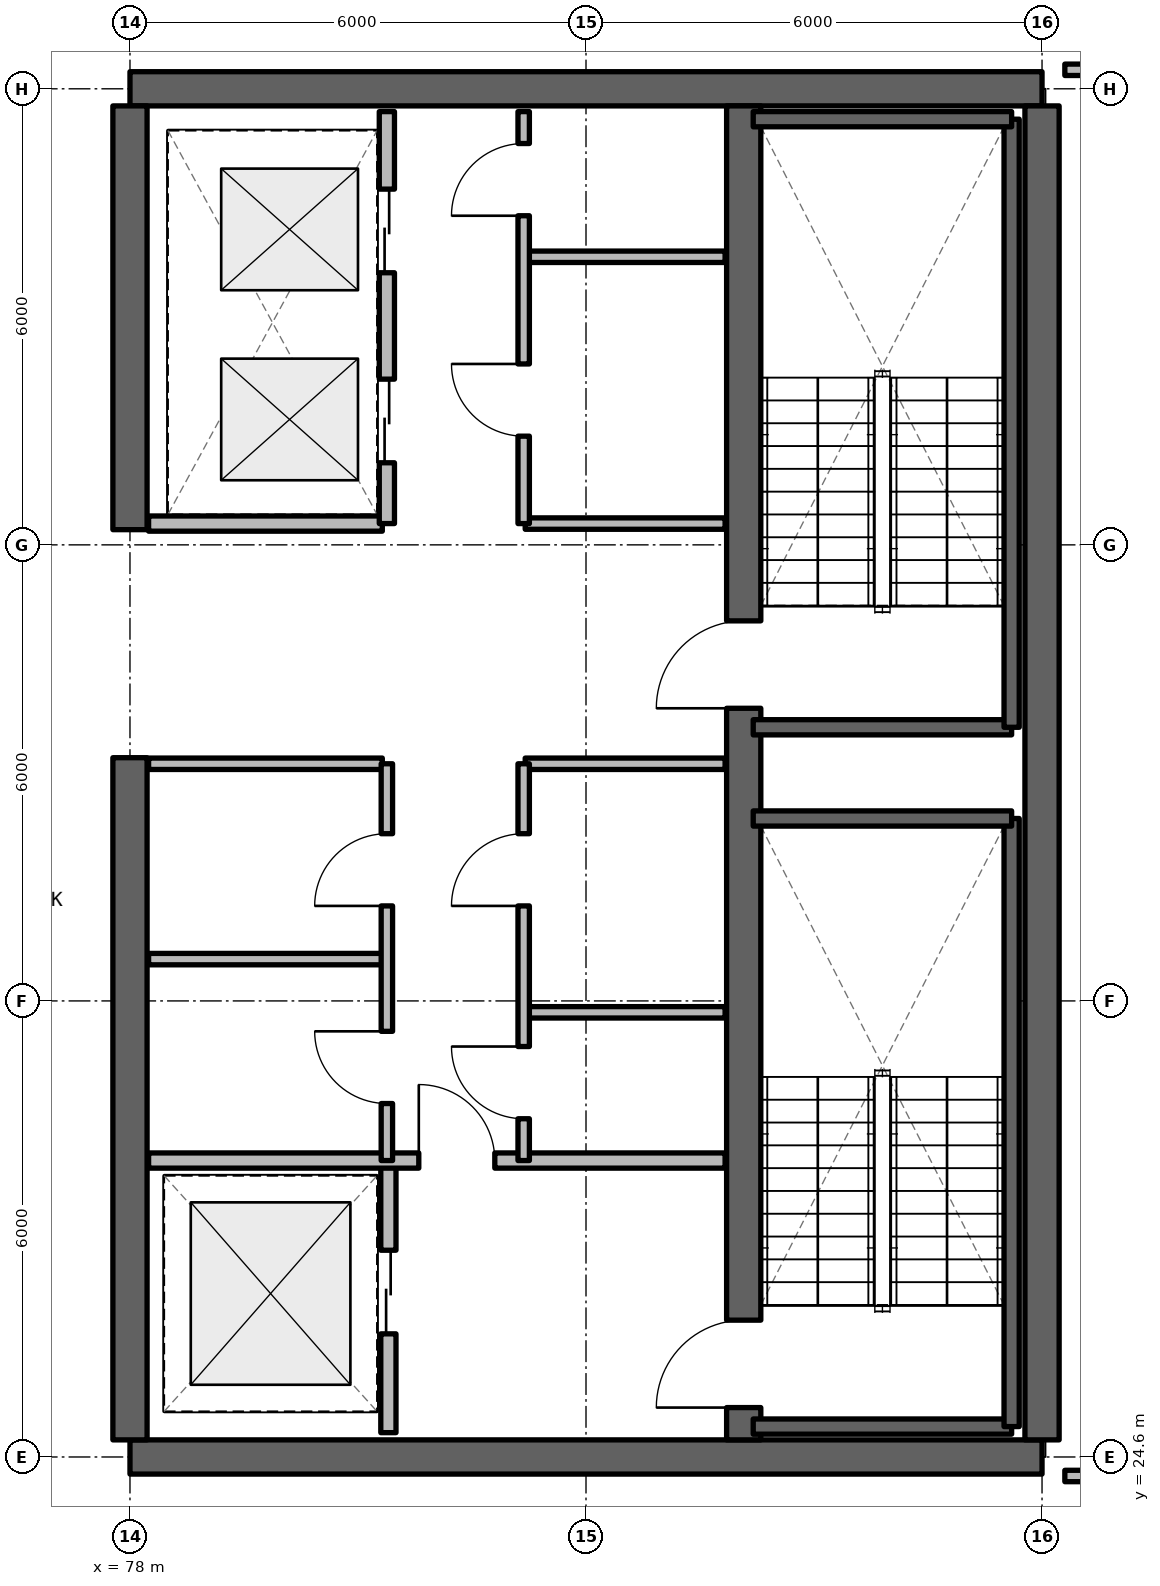
"""IFC4 building model, lengths in metres.
Left out: names, types, materials, properties, quantities, classifications, styles, units other than length and angle.
Written with IfcOpenShell. Run it as: python <this file> out.ifc"""

import sys

from ifc_helpers import new_model, si_unit, direction, frame, frame_2d, origin, place, context, subcontext, project, spatial, rectangle, extrude, element, fill, save


model = new_model("IFC4")
c1 = context("Model", 3, precision=1e-05, world=origin(), true_north=direction((0.0, 1.0)))
c2 = subcontext(c1, "Body", "Model", "MODEL_VIEW")
j1 = project(units=[si_unit("LENGTHUNIT", "METRE"), si_unit("PLANEANGLEUNIT", "RADIAN")], contexts=[c1])
p1 = place(None, origin())
s1 = spatial("IfcSite", under=j1, at=p1, CompositionType="ELEMENT")
p2 = place(p1, origin())
s2 = spatial("IfcBuilding", under=s1, at=p2, CompositionType="ELEMENT")
p3 = place(p2, frame((0.0, 0.0, 267.96)))
s3 = spatial("IfcBuildingStorey", under=s2, at=p3, CompositionType="ELEMENT", Elevation=267.96)
for number, where, z_axis, x_axis in (
    (1, (78.0, 24.6, 0.0), (0.0, 0.0, 1.0), (1.0, 0.0, 0.0)),
    (2, (90.0, 42.6, 0.0), (0.0, 0.0, 1.0), (-1.0, 0.0, 0.0)),
):
    element("IfcWall", number, at=place(p3, frame(where, z_axis=z_axis, x_axis=x_axis)), inside=s3, PredefinedType="SHEAR", context=c2, shape_type="SweptSolid", body=[
        extrude(rectangle(XDim=12.0, YDim=0.45, at=frame_2d((6.0, 0.0))), origin(), (0.0, 0.0, 1.0), 3.63),
    ])
p4 = place(p3, frame((90.0, 24.825, 0.0), z_axis=(0.0, 0.0, 1.0), x_axis=(0.0, 1.0, 0.0)))
e3 = element("IfcWall", 3, at=p4, inside=s3, PredefinedType="SHEAR", context=c2, shape_type="SweptSolid", body=[
    extrude(rectangle(XDim=17.55, YDim=0.45, at=frame_2d((8.775, 0.0))), origin(), (0.0, 0.0, 1.0), 3.63),
])
p5 = place(p3, frame((78.0, 24.825, 0.0), z_axis=(0.0, 0.0, 1.0), x_axis=(0.0, 1.0, 0.0)))
e4 = element("IfcWall", 4, at=p5, inside=s3, PredefinedType="SHEAR", context=c2, shape_type="SweptSolid", body=[
    extrude(rectangle(XDim=8.975, YDim=0.45, at=frame_2d((4.488, 0.0))), origin(), (0.0, 0.0, 1.0), 3.63),
])
p6 = place(p3, frame((78.0, 36.8, 0.0), z_axis=(0.0, 0.0, 1.0), x_axis=(0.0, 1.0, 0.0)))
e5 = element("IfcWall", 5, at=p6, inside=s3, PredefinedType="SHEAR", context=c2, shape_type="SweptSolid", body=[
    extrude(rectangle(XDim=5.575, YDim=0.45, at=frame_2d((2.788, 0.0))), origin(), (0.0, 0.0, 1.0), 3.63),
])
p7 = place(p3, frame((86.075, 24.825, 0.0), z_axis=(0.0, 0.0, 1.0), x_axis=(0.0, 1.0, 0.0)))
e6 = element("IfcWall", 6, at=p7, inside=s3, PredefinedType="SHEAR", context=c2, shape_type="SweptSolid", body=[
    extrude(rectangle(XDim=17.55, YDim=0.45, at=frame_2d((8.775, 0.0))), origin(), (0.0, 0.0, 1.0), 3.63),
])
p8 = place(p7, frame((0.425, 0.0, 0.0)))
e7 = element("IfcOpeningElement", 7, at=p8, cuts=e6, PredefinedType="OPENING", context=c2, shape_type="SweptSolid", body=[
    extrude(rectangle(XDim=1.15, YDim=2.15, at=frame_2d((0.575, 1.075))), frame((0.0, 0.235, 0.0), z_axis=(0.0, -1.0, 0.0), x_axis=(1.0, 0.0, 0.0)), (0.0, 0.0, 1.0), 0.47),
])
p9 = place(p7, frame((9.625, 0.0, 0.0)))
e8 = element("IfcOpeningElement", 8, at=p9, cuts=e6, PredefinedType="OPENING", context=c2, shape_type="SweptSolid", body=[
    extrude(rectangle(XDim=1.15, YDim=2.15, at=frame_2d((0.575, 1.075))), frame((0.0, 0.235, 0.0), z_axis=(0.0, -1.0, 0.0), x_axis=(1.0, 0.0, 0.0)), (0.0, 0.0, 1.0), 0.47),
])
p10 = place(p3, frame((81.4, 24.92, 0.0), z_axis=(0.0, 0.0, 1.0), x_axis=(0.0, 1.0, 0.0)))
e9 = element("IfcWall", 9, at=p10, inside=s3, PredefinedType="SOLIDWALL", context=c2, shape_type="SweptSolid", body=[
    extrude(rectangle(XDim=3.58, YDim=0.2, at=frame_2d((1.79, 0.0))), origin(), (0.0, 0.0, 1.0), 2.63),
])
p11 = place(p10, frame((1.3, 0.0, 0.0)))
e10 = element("IfcOpeningElement", 10, at=p11, cuts=e9, PredefinedType="OPENING", context=c2, shape_type="SweptSolid", body=[
    extrude(rectangle(XDim=1.1, YDim=2.2, at=frame_2d((0.55, 1.1))), frame((0.0, 0.11, 0.0), z_axis=(0.0, -1.0, 0.0), x_axis=(1.0, 0.0, 0.0)), (0.0, 0.0, 1.0), 0.22),
])
p12 = place(p3, frame((78.245, 28.5, 0.0), z_axis=(0.0, 0.0, 1.0), x_axis=(1.0, 0.0, 0.0)))
e11 = element("IfcWall", 11, at=p12, inside=s3, PredefinedType="SOLIDWALL", context=c2, shape_type="SweptSolid", body=[
    extrude(rectangle(XDim=7.585, YDim=0.2, at=frame_2d((3.792, 0.0))), origin(), (0.0, 0.0, 1.0), 2.63),
])
p13 = place(p12, frame((3.555, 0.0, 0.0)))
e12 = element("IfcOpeningElement", 12, at=p13, cuts=e11, PredefinedType="OPENING", context=c2, shape_type="SweptSolid", body=[
    extrude(rectangle(XDim=1.0, YDim=2.15, at=frame_2d((0.5, 1.075))), frame((0.0, 0.11, 0.0), z_axis=(0.0, -1.0, 0.0), x_axis=(1.0, 0.0, 0.0)), (0.0, 0.0, 1.0), 0.22),
])
for number, where, z_axis, x_axis in (
    (13, (83.2, 30.45, 0.0), (0.0, 0.0, 1.0), (1.0, 0.0, 0.0)),
    (14, (83.2, 33.72, 0.0), (0.0, 0.0, 1.0), (1.0, 0.0, 0.0)),
):
    element("IfcWall", number, at=place(p3, frame(where, z_axis=z_axis, x_axis=x_axis)), inside=s3, PredefinedType="SOLIDWALL", context=c2, shape_type="SweptSolid", body=[
        extrude(rectangle(XDim=2.63, YDim=0.15, at=frame_2d((1.315, 0.0))), origin(), (0.0, 0.0, 1.0), 2.63),
    ])
p14 = place(p3, frame((83.18, 28.5, 0.0), z_axis=(0.0, 0.0, 1.0), x_axis=(0.0, 1.0, 0.0)))
e15 = element("IfcWall", 15, at=p14, inside=s3, PredefinedType="SOLIDWALL", context=c2, shape_type="SweptSolid", body=[
    extrude(rectangle(XDim=5.22, YDim=0.15, at=frame_2d((2.61, 0.0))), origin(), (0.0, 0.0, 1.0), 2.63),
])
p15 = place(p14, frame((0.55, 0.0, 0.0)))
e16 = element("IfcOpeningElement", 16, at=p15, cuts=e15, PredefinedType="OPENING", context=c2, shape_type="SweptSolid", body=[
    extrude(rectangle(XDim=0.95, YDim=2.15, at=frame_2d((0.475, 1.075))), frame((0.0, 0.085, 0.0), z_axis=(0.0, -1.0, 0.0), x_axis=(1.0, 0.0, 0.0)), (0.0, 0.0, 1.0), 0.17),
])
p16 = place(p14, frame((3.35, 0.0, 0.0)))
e17 = element("IfcOpeningElement", 17, at=p16, cuts=e15, PredefinedType="OPENING", context=c2, shape_type="SweptSolid", body=[
    extrude(rectangle(XDim=0.95, YDim=2.15, at=frame_2d((0.475, 1.075))), frame((0.0, 0.085, 0.0), z_axis=(0.0, -1.0, 0.0), x_axis=(1.0, 0.0, 0.0)), (0.0, 0.0, 1.0), 0.17),
])
for number, where, z_axis, x_axis in (
    (18, (78.245, 31.15, 0.0), (0.0, 0.0, 1.0), (1.0, 0.0, 0.0)),
    (19, (78.245, 33.72, 0.0), (0.0, 0.0, 1.0), (1.0, 0.0, 0.0)),
):
    element("IfcWall", number, at=place(p3, frame(where, z_axis=z_axis, x_axis=x_axis)), inside=s3, PredefinedType="SOLIDWALL", context=c2, shape_type="SweptSolid", body=[
        extrude(rectangle(XDim=3.075, YDim=0.15, at=frame_2d((1.538, 0.0))), origin(), (0.0, 0.0, 1.0), 2.63),
    ])
p17 = place(p3, frame((81.38, 28.5, 0.0), z_axis=(0.0, 0.0, 1.0), x_axis=(0.0, 1.0, 0.0)))
e20 = element("IfcWall", 20, at=p17, inside=s3, PredefinedType="SOLIDWALL", context=c2, shape_type="SweptSolid", body=[
    extrude(rectangle(XDim=5.22, YDim=0.15, at=frame_2d((2.61, 0.0))), origin(), (0.0, 0.0, 1.0), 2.63),
])
p18 = place(p17, frame((0.75, 0.0, 0.0)))
e21 = element("IfcOpeningElement", 21, at=p18, cuts=e20, PredefinedType="OPENING", context=c2, shape_type="SweptSolid", body=[
    extrude(rectangle(XDim=0.95, YDim=2.15, at=frame_2d((0.475, 1.075))), frame((0.0, 0.085, 0.0), z_axis=(0.0, -1.0, 0.0), x_axis=(1.0, 0.0, 0.0)), (0.0, 0.0, 1.0), 0.17),
])
p19 = place(p17, frame((3.35, 0.0, 0.0)))
e22 = element("IfcOpeningElement", 22, at=p19, cuts=e20, PredefinedType="OPENING", context=c2, shape_type="SweptSolid", body=[
    extrude(rectangle(XDim=0.95, YDim=2.15, at=frame_2d((0.475, 1.075))), frame((0.0, 0.085, 0.0), z_axis=(0.0, -1.0, 0.0), x_axis=(1.0, 0.0, 0.0)), (0.0, 0.0, 1.0), 0.17),
])
for number, where, z_axis, x_axis in (
    (23, (83.2, 36.88, 0.0), (0.0, 0.0, 1.0), (1.0, 0.0, 0.0)),
    (24, (83.2, 40.39, 0.0), (0.0, 0.0, 1.0), (1.0, 0.0, 0.0)),
):
    element("IfcWall", number, at=place(p3, frame(where, z_axis=z_axis, x_axis=x_axis)), inside=s3, PredefinedType="SOLIDWALL", context=c2, shape_type="SweptSolid", body=[
        extrude(rectangle(XDim=2.63, YDim=0.15, at=frame_2d((1.315, 0.0))), origin(), (0.0, 0.0, 1.0), 2.63),
    ])
p20 = place(p3, frame((83.18, 36.88, 0.0), z_axis=(0.0, 0.0, 1.0), x_axis=(0.0, 1.0, 0.0)))
e25 = element("IfcWall", 25, at=p20, inside=s3, PredefinedType="SOLIDWALL", context=c2, shape_type="SweptSolid", body=[
    extrude(rectangle(XDim=5.42, YDim=0.15, at=frame_2d((2.71, 0.0))), origin(), (0.0, 0.0, 1.0), 2.63),
])
p21 = place(p20, frame((1.15, 0.0, 0.0)))
e26 = element("IfcOpeningElement", 26, at=p21, cuts=e25, PredefinedType="OPENING", context=c2, shape_type="SweptSolid", body=[
    extrude(rectangle(XDim=0.95, YDim=2.15, at=frame_2d((0.475, 1.075))), frame((0.0, 0.085, 0.0), z_axis=(0.0, -1.0, 0.0), x_axis=(1.0, 0.0, 0.0)), (0.0, 0.0, 1.0), 0.17),
])
p22 = place(p20, frame((4.05, 0.0, 0.0)))
e27 = element("IfcOpeningElement", 27, at=p22, cuts=e25, PredefinedType="OPENING", context=c2, shape_type="SweptSolid", body=[
    extrude(rectangle(XDim=0.95, YDim=2.15, at=frame_2d((0.475, 1.075))), frame((0.0, 0.085, 0.0), z_axis=(0.0, -1.0, 0.0), x_axis=(1.0, 0.0, 0.0)), (0.0, 0.0, 1.0), 0.17),
])
p23 = place(p3, frame((78.245, 36.88, 0.0), z_axis=(0.0, 0.0, 1.0), x_axis=(1.0, 0.0, 0.0)))
e28 = element("IfcWall", 28, at=p23, inside=s3, PredefinedType="SOLIDWALL", context=c2, shape_type="SweptSolid", body=[
    extrude(rectangle(XDim=3.075, YDim=0.2, at=frame_2d((1.538, 0.0))), origin(), (0.0, 0.0, 1.0), 2.63),
])
p24 = place(p3, frame((81.38, 36.88, 0.0), z_axis=(0.0, 0.0, 1.0), x_axis=(0.0, 1.0, 0.0)))
e29 = element("IfcWall", 29, at=p24, inside=s3, PredefinedType="SOLIDWALL", context=c2, shape_type="SweptSolid", body=[
    extrude(rectangle(XDim=5.42, YDim=0.2, at=frame_2d((2.71, 0.0))), origin(), (0.0, 0.0, 1.0), 2.63),
])
p25 = place(p24, frame((0.8, 0.0, 0.0)))
e30 = element("IfcOpeningElement", 30, at=p25, cuts=e29, PredefinedType="OPENING", context=c2, shape_type="SweptSolid", body=[
    extrude(rectangle(XDim=1.1, YDim=2.2, at=frame_2d((0.55, 1.1))), frame((0.0, 0.11, 0.0), z_axis=(0.0, -1.0, 0.0), x_axis=(1.0, 0.0, 0.0)), (0.0, 0.0, 1.0), 0.22),
])
p26 = place(p24, frame((3.3, 0.0, 0.0)))
e31 = element("IfcOpeningElement", 31, at=p26, cuts=e29, PredefinedType="OPENING", context=c2, shape_type="SweptSolid", body=[
    extrude(rectangle(XDim=1.1, YDim=2.2, at=frame_2d((0.55, 1.1))), frame((0.0, 0.11, 0.0), z_axis=(0.0, -1.0, 0.0), x_axis=(1.0, 0.0, 0.0)), (0.0, 0.0, 1.0), 0.22),
])
p27 = place(p3, frame((90.3, 24.35, 0.0), z_axis=(0.0, 0.0, 1.0), x_axis=(1.0, 0.0, 0.0)))
e32 = element("IfcWall", 32, at=p27, inside=s3, PredefinedType="SOLIDWALL", context=c2, shape_type="SweptSolid", body=[
    extrude(rectangle(XDim=8.52, YDim=0.15, at=frame_2d((4.26, 0.0))), origin(), (0.0, 0.0, 1.0), 2.63),
])
p28 = place(p27, frame((0.975, 0.0, 0.0)))
e33 = element("IfcOpeningElement", 33, at=p28, cuts=e32, PredefinedType="OPENING", context=c2, shape_type="SweptSolid", body=[
    extrude(rectangle(XDim=0.95, YDim=2.15, at=frame_2d((0.475, 1.075))), frame((0.0, 0.085, 0.0), z_axis=(0.0, -1.0, 0.0), x_axis=(1.0, 0.0, 0.0)), (0.0, 0.0, 1.0), 0.17),
])
p29 = place(p3, frame((90.3, 42.85, 0.0), z_axis=(0.0, 0.0, 1.0), x_axis=(1.0, 0.0, 0.0)))
e34 = element("IfcWall", 34, at=p29, inside=s3, PredefinedType="SOLIDWALL", context=c2, shape_type="SweptSolid", body=[
    extrude(rectangle(XDim=8.52, YDim=0.15, at=frame_2d((4.26, 0.0))), origin(), (0.0, 0.0, 1.0), 2.63),
])
p30 = place(p3, frame((86.2, 25.0, 0.0), z_axis=(0.0, 0.0, 1.0), x_axis=(1.0, 0.0, 0.0)))
e35 = element("IfcWall", 35, at=p30, inside=s3, PredefinedType="SOLIDWALL", context=c2, shape_type="SweptSolid", body=[
    extrude(rectangle(XDim=3.4, YDim=0.2, at=frame_2d((1.7, 0.0))), origin(), (0.0, 0.0, 1.0), 3.63),
])
p31 = place(p3, frame((89.6, 25.0, 0.0), z_axis=(0.0, 0.0, 1.0), x_axis=(0.0, 1.0, 0.0)))
e36 = element("IfcWall", 36, at=p31, inside=s3, PredefinedType="SOLIDWALL", context=c2, shape_type="SweptSolid", body=[
    extrude(rectangle(XDim=8.0, YDim=0.2, at=frame_2d((4.0, 0.0))), origin(), (0.0, 0.0, 1.0), 3.63),
])
for number, where, z_axis, x_axis in (
    (37, (89.6, 33.0, 0.0), (0.0, 0.0, 1.0), (-1.0, 0.0, 0.0)),
    (38, (86.2, 34.2, 0.0), (0.0, 0.0, 1.0), (1.0, 0.0, 0.0)),
):
    element("IfcWall", number, at=place(p3, frame(where, z_axis=z_axis, x_axis=x_axis)), inside=s3, PredefinedType="SOLIDWALL", context=c2, shape_type="SweptSolid", body=[
        extrude(rectangle(XDim=3.4, YDim=0.2, at=frame_2d((1.7, 0.0))), origin(), (0.0, 0.0, 1.0), 3.63),
    ])
p32 = place(p3, frame((89.6, 34.2, 0.0), z_axis=(0.0, 0.0, 1.0), x_axis=(0.0, 1.0, 0.0)))
e39 = element("IfcWall", 39, at=p32, inside=s3, PredefinedType="SOLIDWALL", context=c2, shape_type="SweptSolid", body=[
    extrude(rectangle(XDim=8.0, YDim=0.2, at=frame_2d((4.0, 0.0))), origin(), (0.0, 0.0, 1.0), 3.63),
])
p33 = place(p3, frame((89.6, 42.2, 0.0), z_axis=(0.0, 0.0, 1.0), x_axis=(-1.0, 0.0, 0.0)))
e40 = element("IfcWall", 40, at=p33, inside=s3, PredefinedType="SOLIDWALL", context=c2, shape_type="SweptSolid", body=[
    extrude(rectangle(XDim=3.4, YDim=0.2, at=frame_2d((1.7, 0.0))), origin(), (0.0, 0.0, 1.0), 3.63),
])
p34 = place(p11, origin())
e41 = element("IfcDoor", 41, at=p34, inside=s3, OperationType="SLIDING_TO_LEFT", PredefinedType="DOOR", context=c2, shape_type="SweptSolid", body=[
    extrude(rectangle(XDim=1.1, YDim=2.2, at=frame_2d((0.55, 1.1))), frame((0.0, 0.025, 0.0), z_axis=(0.0, -1.0, 0.0), x_axis=(1.0, 0.0, 0.0)), (0.0, 0.0, 1.0), 0.05),
])
fill(e10, e41)
p35 = place(p13, origin())
e42 = element("IfcDoor", 42, at=p35, inside=s3, OperationType="SINGLE_SWING_LEFT", PredefinedType="DOOR", context=c2, shape_type="SweptSolid", body=[
    extrude(rectangle(XDim=1.0, YDim=2.15, at=frame_2d((0.5, 1.075))), frame((0.0, 0.025, 0.0), z_axis=(0.0, -1.0, 0.0), x_axis=(1.0, 0.0, 0.0)), (0.0, 0.0, 1.0), 0.05),
])
fill(e12, e42)
p36 = place(p15, origin())
e43 = element("IfcDoor", 43, at=p36, inside=s3, OperationType="SINGLE_SWING_RIGHT", PredefinedType="DOOR", context=c2, shape_type="SweptSolid", body=[
    extrude(rectangle(XDim=0.95, YDim=2.15, at=frame_2d((0.475, 1.075))), frame((0.0, 0.025, 0.0), z_axis=(0.0, -1.0, 0.0), x_axis=(1.0, 0.0, 0.0)), (0.0, 0.0, 1.0), 0.05),
])
fill(e16, e43)
p37 = place(p16, origin())
e44 = element("IfcDoor", 44, at=p37, inside=s3, OperationType="SINGLE_SWING_LEFT", PredefinedType="DOOR", context=c2, shape_type="SweptSolid", body=[
    extrude(rectangle(XDim=0.95, YDim=2.15, at=frame_2d((0.475, 1.075))), frame((0.0, 0.025, 0.0), z_axis=(0.0, -1.0, 0.0), x_axis=(1.0, 0.0, 0.0)), (0.0, 0.0, 1.0), 0.05),
])
fill(e17, e44)
p38 = place(p18, origin())
e45 = element("IfcDoor", 45, at=p38, inside=s3, OperationType="SINGLE_SWING_RIGHT", PredefinedType="DOOR", context=c2, shape_type="SweptSolid", body=[
    extrude(rectangle(XDim=0.95, YDim=2.15, at=frame_2d((0.475, 1.075))), frame((0.0, 0.025, 0.0), z_axis=(0.0, -1.0, 0.0), x_axis=(1.0, 0.0, 0.0)), (0.0, 0.0, 1.0), 0.05),
])
fill(e21, e45)
p39 = place(p19, origin())
e46 = element("IfcDoor", 46, at=p39, inside=s3, OperationType="SINGLE_SWING_LEFT", PredefinedType="DOOR", context=c2, shape_type="SweptSolid", body=[
    extrude(rectangle(XDim=0.95, YDim=2.15, at=frame_2d((0.475, 1.075))), frame((0.0, 0.025, 0.0), z_axis=(0.0, -1.0, 0.0), x_axis=(1.0, 0.0, 0.0)), (0.0, 0.0, 1.0), 0.05),
])
fill(e22, e46)
p40 = place(p21, origin())
e47 = element("IfcDoor", 47, at=p40, inside=s3, OperationType="SINGLE_SWING_RIGHT", PredefinedType="DOOR", context=c2, shape_type="SweptSolid", body=[
    extrude(rectangle(XDim=0.95, YDim=2.15, at=frame_2d((0.475, 1.075))), frame((0.0, 0.025, 0.0), z_axis=(0.0, -1.0, 0.0), x_axis=(1.0, 0.0, 0.0)), (0.0, 0.0, 1.0), 0.05),
])
fill(e26, e47)
p41 = place(p22, origin())
e48 = element("IfcDoor", 48, at=p41, inside=s3, OperationType="SINGLE_SWING_LEFT", PredefinedType="DOOR", context=c2, shape_type="SweptSolid", body=[
    extrude(rectangle(XDim=0.95, YDim=2.15, at=frame_2d((0.475, 1.075))), frame((0.0, 0.025, 0.0), z_axis=(0.0, -1.0, 0.0), x_axis=(1.0, 0.0, 0.0)), (0.0, 0.0, 1.0), 0.05),
])
fill(e27, e48)
p42 = place(p25, origin())
e49 = element("IfcDoor", 49, at=p42, inside=s3, OperationType="SLIDING_TO_LEFT", PredefinedType="DOOR", context=c2, shape_type="SweptSolid", body=[
    extrude(rectangle(XDim=1.1, YDim=2.2, at=frame_2d((0.55, 1.1))), frame((0.0, 0.025, 0.0), z_axis=(0.0, -1.0, 0.0), x_axis=(1.0, 0.0, 0.0)), (0.0, 0.0, 1.0), 0.05),
])
fill(e30, e49)
p43 = place(p26, origin())
e50 = element("IfcDoor", 50, at=p43, inside=s3, OperationType="SLIDING_TO_RIGHT", PredefinedType="DOOR", context=c2, shape_type="SweptSolid", body=[
    extrude(rectangle(XDim=1.1, YDim=2.2, at=frame_2d((0.55, 1.1))), frame((0.0, 0.025, 0.0), z_axis=(0.0, -1.0, 0.0), x_axis=(1.0, 0.0, 0.0)), (0.0, 0.0, 1.0), 0.05),
])
fill(e31, e50)
p44 = place(p8, origin())
e51 = element("IfcDoor", 51, at=p44, inside=s3, OperationType="SINGLE_SWING_LEFT", PredefinedType="DOOR", context=c2, shape_type="SweptSolid", body=[
    extrude(rectangle(XDim=1.15, YDim=2.15, at=frame_2d((0.575, 1.075))), frame((0.0, 0.025, 0.0), z_axis=(0.0, -1.0, 0.0), x_axis=(1.0, 0.0, 0.0)), (0.0, 0.0, 1.0), 0.05),
])
fill(e7, e51)
p45 = place(p9, origin())
e52 = element("IfcDoor", 52, at=p45, inside=s3, OperationType="SINGLE_SWING_RIGHT", PredefinedType="DOOR", context=c2, shape_type="SweptSolid", body=[
    extrude(rectangle(XDim=1.15, YDim=2.15, at=frame_2d((0.575, 1.075))), frame((0.0, 0.025, 0.0), z_axis=(0.0, -1.0, 0.0), x_axis=(1.0, 0.0, 0.0)), (0.0, 0.0, 1.0), 0.05),
])
fill(e8, e52)
save(model, sys.argv[1])
